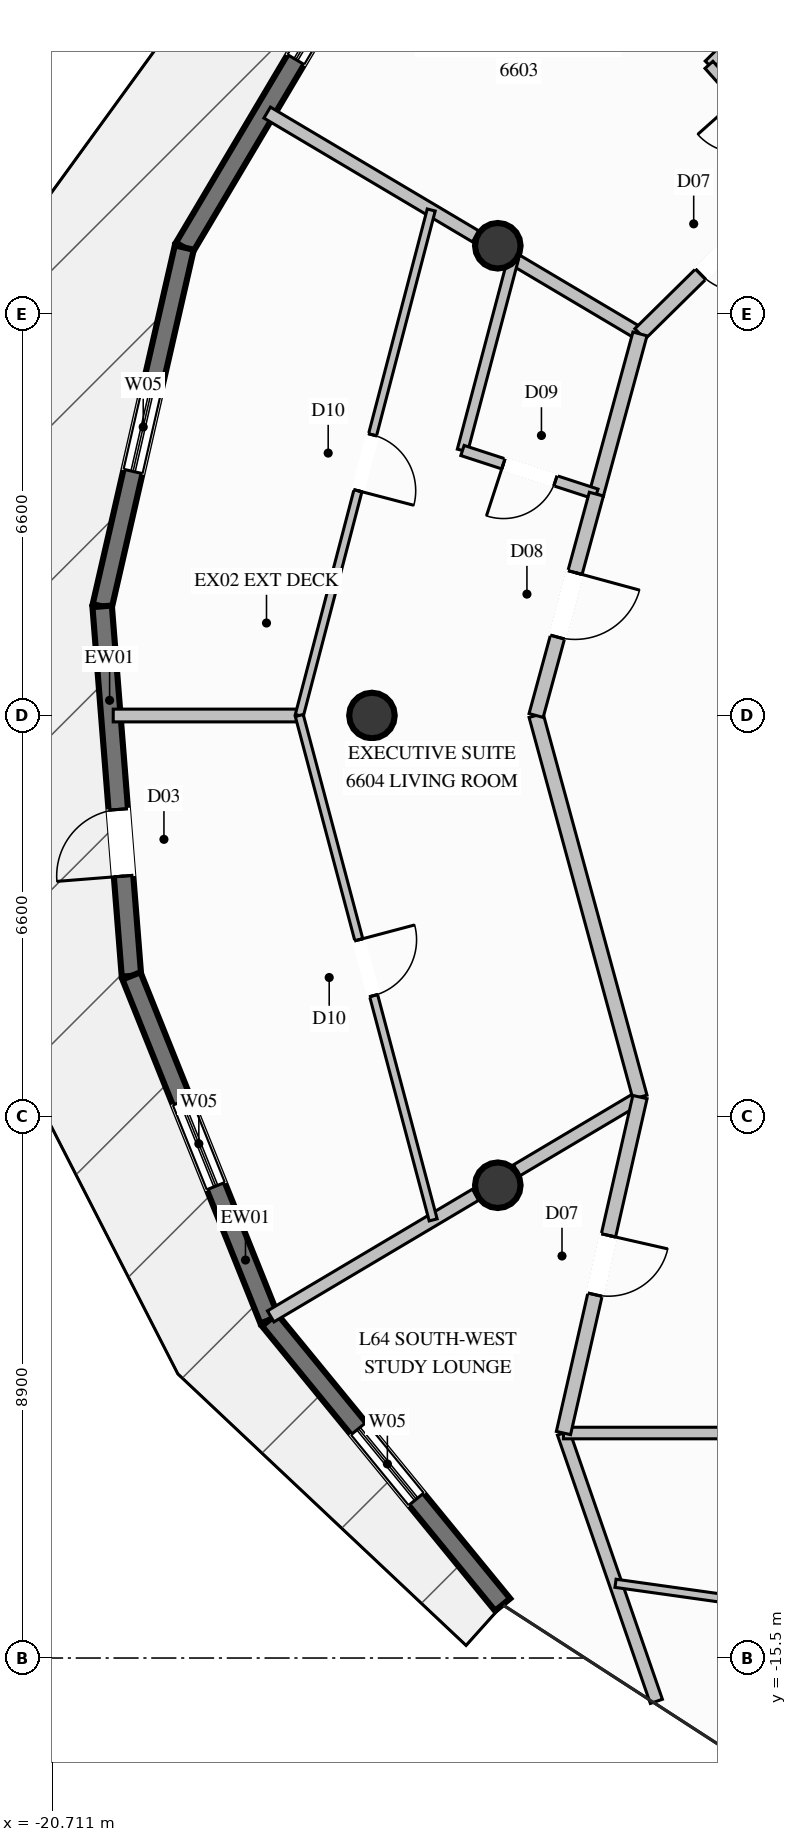
"""IFC4 building model, lengths in metres.
Left out: names, types, materials, properties, quantities, classifications, styles, units other than length and angle.
Written with IfcOpenShell. Run it as: python <this file> out.ifc"""

import sys

from ifc_helpers import new_model, si_unit, direction, frame, frame_2d, origin, origin_2d, place, context, subcontext, project, spatial, rectangle, circle, extrude, element, fill, save


model = new_model("IFC4")
c1 = context("Model", 3, precision=1e-05, world=origin(), true_north=direction((0.0, 1.0)))
c2 = subcontext(c1, "Body", "Model", "MODEL_VIEW")
j1 = project(units=[si_unit("LENGTHUNIT", "METRE"), si_unit("PLANEANGLEUNIT", "RADIAN")], contexts=[c1])
p1 = place(None, origin())
s1 = spatial("IfcSite", under=j1, at=p1, CompositionType="ELEMENT")
p2 = place(p1, origin())
s2 = spatial("IfcBuilding", under=s1, at=p2, CompositionType="ELEMENT")
p3 = place(p2, frame((0.0, 0.0, 246.8)))
s3 = spatial("IfcBuildingStorey", under=s2, at=p3, CompositionType="ELEMENT", Elevation=246.8)
for number, where, z_axis, x_axis in (
    (1, (-13.38, 7.725, 0.0), (0.0, 0.0, 1.0), (1.0, 0.0, 0.0)),
    (2, (-15.45, 0.0, 0.0), (0.0, 0.0, 1.0), (1.0, 0.0, 0.0)),
    (3, (-13.38, -7.725, 0.0), (0.0, 0.0, 1.0), (1.0, 0.0, 0.0)),
):
    element("IfcColumn", number, at=place(p3, frame(where, z_axis=z_axis, x_axis=x_axis)), inside=s3, PredefinedType="COLUMN", context=c2, shape_type="SweptSolid", body=[
        extrude(circle(Radius=0.375, at=origin_2d()), origin(), (0.0, 0.0, 1.0), 3.8),
    ])
p4 = place(p3, frame((-18.536, 7.695, 0.0), z_axis=(0.0, 0.0, 1.0), x_axis=(0.510284251863, 0.860005803644, 0.0)))
e4 = element("IfcWall", 4, at=p4, inside=s3, PredefinedType="SOLIDWALL", context=c2, shape_type="SweptSolid", body=[
    extrude(rectangle(XDim=5.985, YDim=0.32, at=frame_2d((2.992, 0.0))), origin(), (0.0, 0.0, 1.0), 3.57),
])
p5 = place(p4, frame((3.595, 0.0, 0.85)))
e5 = element("IfcOpeningElement", 5, at=p5, cuts=e4, PredefinedType="OPENING", context=c2, shape_type="SweptSolid", body=[
    extrude(rectangle(XDim=1.5, YDim=1.2, at=frame_2d((0.75, 0.6))), frame((0.0, 0.17, 0.0), z_axis=(0.0, -1.0, 0.0), x_axis=(1.0, 0.0, 0.0)), (0.0, 0.0, 1.0), 0.34),
])
p6 = place(p3, frame((-19.887, 1.795, 0.0), z_axis=(0.0, 0.0, 1.0), x_axis=(0.223212485592, 0.974769811943, 0.0)))
e6 = element("IfcWall", 6, at=p6, inside=s3, PredefinedType="SOLIDWALL", context=c2, shape_type="SweptSolid", body=[
    extrude(rectangle(XDim=6.053, YDim=0.32, at=frame_2d((3.026, 0.0))), origin(), (0.0, 0.0, 1.0), 3.57),
])
p7 = place(p6, frame((2.276, 0.0, 0.85)))
e7 = element("IfcOpeningElement", 7, at=p7, cuts=e6, PredefinedType="OPENING", context=c2, shape_type="SweptSolid", body=[
    extrude(rectangle(XDim=1.5, YDim=1.2, at=frame_2d((0.75, 0.6))), frame((0.0, 0.17, 0.0), z_axis=(0.0, -1.0, 0.0), x_axis=(1.0, 0.0, 0.0)), (0.0, 0.0, 1.0), 0.34),
])
p8 = place(p3, frame((-19.405, -4.282, 0.0), z_axis=(0.0, 0.0, 1.0), x_axis=(-0.079057550351, 0.996870053584, 0.0)))
e8 = element("IfcWall", 8, at=p8, inside=s3, PredefinedType="SOLIDWALL", context=c2, shape_type="SweptSolid", body=[
    extrude(rectangle(XDim=6.096, YDim=0.32, at=frame_2d((3.048, 0.0))), origin(), (0.0, 0.0, 1.0), 3.57),
])
p9 = place(p8, frame((1.646, 0.0, 0.0)))
e9 = element("IfcOpeningElement", 9, at=p9, cuts=e8, PredefinedType="OPENING", context=c2, shape_type="SweptSolid", body=[
    extrude(rectangle(XDim=1.1, YDim=2.2, at=frame_2d((0.55, 1.1))), frame((0.0, 0.17, 0.0), z_axis=(0.0, -1.0, 0.0), x_axis=(1.0, 0.0, 0.0)), (0.0, 0.0, 1.0), 0.34),
])
p10 = place(p3, frame((-17.135, -9.939, 0.0), z_axis=(0.0, 0.0, 1.0), x_axis=(-0.372412492589, 0.928067311871, 0.0)))
e10 = element("IfcWall", 10, at=p10, inside=s3, PredefinedType="SOLIDWALL", context=c2, shape_type="SweptSolid", body=[
    extrude(rectangle(XDim=6.095, YDim=0.32, at=frame_2d((3.048, 0.0))), origin(), (0.0, 0.0, 1.0), 3.57),
])
p11 = place(p10, frame((2.37, 0.0, 0.85)))
e11 = element("IfcOpeningElement", 11, at=p11, cuts=e10, PredefinedType="OPENING", context=c2, shape_type="SweptSolid", body=[
    extrude(rectangle(XDim=1.5, YDim=1.2, at=frame_2d((0.75, 0.6))), frame((0.0, 0.17, 0.0), z_axis=(0.0, -1.0, 0.0), x_axis=(1.0, 0.0, 0.0)), (0.0, 0.0, 1.0), 0.34),
])
p12 = place(p3, frame((-13.301, -14.623, 0.0), z_axis=(0.0, 0.0, 1.0), x_axis=(-0.633391522875, 0.773831492478, 0.0)))
e12 = element("IfcWall", 12, at=p12, inside=s3, PredefinedType="SOLIDWALL", context=c2, shape_type="SweptSolid", body=[
    extrude(rectangle(XDim=6.053, YDim=0.32, at=frame_2d((3.027, 0.0))), origin(), (0.0, 0.0, 1.0), 3.57),
])
p13 = place(p12, frame((2.242, 0.0, 0.85)))
e13 = element("IfcOpeningElement", 13, at=p13, cuts=e12, PredefinedType="OPENING", context=c2, shape_type="SweptSolid", body=[
    extrude(rectangle(XDim=1.5, YDim=1.2, at=frame_2d((0.75, 0.6))), frame((0.0, 0.17, 0.0), z_axis=(0.0, -1.0, 0.0), x_axis=(1.0, 0.0, 0.0)), (0.0, 0.0, 1.0), 0.34),
])
p14 = place(p3, frame((-11.042, 6.275, 0.0), z_axis=(0.0, 0.0, 1.0), x_axis=(-0.859975377651, 0.510335526721, 0.0)))
e14 = element("IfcWall", 14, at=p14, inside=s3, PredefinedType="PARTITIONING", context=c2, shape_type="SweptSolid", body=[
    extrude(rectangle(XDim=2.359, YDim=0.21, at=frame_2d((1.18, 0.0))), origin(), (0.0, 0.0, 1.0), 3.011),
])
p15 = place(p3, frame((-13.744, 7.879, 0.0), z_axis=(0.0, 0.0, 1.0), x_axis=(-0.859849705024, 0.510547240488, 0.0)))
e15 = element("IfcWall", 15, at=p15, inside=s3, PredefinedType="PARTITIONING", context=c2, shape_type="SweptSolid", body=[
    extrude(rectangle(XDim=3.988, YDim=0.21, at=frame_2d((1.994, 0.0))), origin(), (0.0, 0.0, 1.0), 3.57),
])
p16 = place(p3, frame((-11.042, -6.275, 0.0), z_axis=(0.0, 0.0, 1.0), x_axis=(-0.859685751386, -0.510823265781, 0.0)))
e16 = element("IfcWall", 16, at=p16, inside=s3, PredefinedType="PARTITIONING", context=c2, shape_type="SweptSolid", body=[
    extrude(rectangle(XDim=2.359, YDim=0.21, at=frame_2d((1.18, 0.0))), origin(), (0.0, 0.0, 1.0), 3.011),
])
p17 = place(p3, frame((-13.744, -7.88, 0.0), z_axis=(0.0, 0.0, 1.0), x_axis=(-0.8597863995, -0.510653842867, 0.0)))
e17 = element("IfcWall", 17, at=p17, inside=s3, PredefinedType="PARTITIONING", context=c2, shape_type="SweptSolid", body=[
    extrude(rectangle(XDim=3.921, YDim=0.21, at=frame_2d((1.96, 0.0))), origin(), (0.0, 0.0, 1.0), 3.57),
])
p18 = place(p3, frame((-7.575, 13.007, 0.0), z_axis=(0.0, 0.0, 1.0), x_axis=(-0.710892186869, -0.703301001456, 0.0)))
e18 = element("IfcWall", 18, at=p18, inside=s3, PredefinedType="PLUMBINGWALL", context=c2, shape_type="SweptSolid", body=[
    extrude(rectangle(XDim=3.281, YDim=0.175, at=frame_2d((1.64, 0.0))), origin(), (0.0, 0.0, 1.0), 3.139),
])
p19 = place(p3, frame((-8.335, 8.94, 0.0), z_axis=(0.0, 0.0, 1.0), x_axis=(-0.666153503552, 0.745814661766, 0.0)))
e19 = element("IfcWall", 19, at=p19, inside=s3, PredefinedType="PLUMBINGWALL", context=c2, shape_type="SweptSolid", body=[
    extrude(rectangle(XDim=2.36, YDim=0.175, at=frame_2d((1.18, 0.0))), origin(), (0.0, 0.0, 1.0), 3.57),
])
p20 = place(p19, frame((0.73, 0.0, 0.0)))
e20 = element("IfcOpeningElement", 20, at=p20, cuts=e19, PredefinedType="OPENING", context=c2, shape_type="SweptSolid", body=[
    extrude(rectangle(XDim=0.9, YDim=2.1, at=frame_2d((0.45, 1.05))), frame((0.0, 0.098, 0.0), z_axis=(0.0, -1.0, 0.0), x_axis=(1.0, 0.0, 0.0)), (0.0, 0.0, 1.0), 0.195),
])
p21 = place(p3, frame((-8.335, 8.94, 0.0), z_axis=(0.0, 0.0, 1.0), x_axis=(-0.712612295011, -0.701558063883, 0.0)))
e21 = element("IfcWall", 21, at=p21, inside=s3, PredefinedType="PARTITIONING", context=c2, shape_type="SweptSolid", body=[
    extrude(rectangle(XDim=3.799, YDim=0.24, at=frame_2d((1.899, 0.0))), origin(), (0.0, 0.0, 1.0), 3.57),
])
p22 = place(p21, frame((1.399, 0.0, 0.0)))
e22 = element("IfcOpeningElement", 22, at=p22, cuts=e21, PredefinedType="OPENING", context=c2, shape_type="SweptSolid", body=[
    extrude(rectangle(XDim=1.0, YDim=2.2, at=frame_2d((0.5, 1.1))), frame((0.0, 0.13, 0.0), z_axis=(0.0, -1.0, 0.0), x_axis=(1.0, 0.0, 0.0)), (0.0, 0.0, 1.0), 0.26),
])
p23 = place(p3, frame((-11.042, 6.275, 0.0), z_axis=(0.0, 0.0, 1.0), x_axis=(-0.262572701387, -0.964912211803, 0.0)))
e23 = element("IfcWall", 23, at=p23, inside=s3, PredefinedType="PARTITIONING", context=c2, shape_type="SweptSolid", body=[
    extrude(rectangle(XDim=2.731, YDim=0.24, at=frame_2d((1.365, 0.0))), origin(), (0.0, 0.0, 1.0), 3.57),
])
p24 = place(p3, frame((-13.127, 7.513, 0.0), z_axis=(0.0, 0.0, 1.0), x_axis=(-0.25555737321, -0.966793891684, 0.0)))
e24 = element("IfcWall", 24, at=p24, inside=s3, PredefinedType="PLUMBINGWALL", context=c2, shape_type="SweptSolid", body=[
    extrude(rectangle(XDim=3.263, YDim=0.175, at=frame_2d((1.632, 0.0))), origin(), (0.0, 0.0, 1.0), 3.006),
])
p25 = place(p3, frame((-11.759, 3.64, 0.0), z_axis=(0.0, 0.0, 1.0), x_axis=(-0.950729164037, 0.310022671187, 0.0)))
e25 = element("IfcWall", 25, at=p25, inside=s3, PredefinedType="PLUMBINGWALL", context=c2, shape_type="SweptSolid", body=[
    extrude(rectangle(XDim=2.316, YDim=0.175, at=frame_2d((1.158, 0.0))), origin(), (0.0, 0.0, 1.0), 3.57),
])
p26 = place(p25, frame((0.708, 0.0, 0.0)))
e26 = element("IfcOpeningElement", 26, at=p26, cuts=e25, PredefinedType="OPENING", context=c2, shape_type="SweptSolid", body=[
    extrude(rectangle(XDim=0.9, YDim=2.1, at=frame_2d((0.45, 1.05))), frame((0.0, 0.098, 0.0), z_axis=(0.0, -1.0, 0.0), x_axis=(1.0, 0.0, 0.0)), (0.0, 0.0, 1.0), 0.195),
])
p27 = place(p3, frame((-16.645, 0.0, 0.0), z_axis=(0.0, 0.0, 1.0), x_axis=(-1.0, 0.0, 0.0)))
e27 = element("IfcWall", 27, at=p27, inside=s3, PredefinedType="PARTITIONING", context=c2, shape_type="SweptSolid", body=[
    extrude(rectangle(XDim=3.06, YDim=0.21, at=frame_2d((1.53, 0.0))), origin(), (0.0, 0.0, 1.0), 2.619),
])
p28 = place(p3, frame((-12.75, 0.0, 0.0), z_axis=(0.0, 0.0, 1.0), x_axis=(0.262640884433, -0.964893655189, 0.0)))
e28 = element("IfcWall", 28, at=p28, inside=s3, PredefinedType="PARTITIONING", context=c2, shape_type="SweptSolid", body=[
    extrude(rectangle(XDim=6.503, YDim=0.24, at=frame_2d((3.251, 0.0))), origin(), (0.0, 0.0, 1.0), 3.57),
])
p29 = place(p3, frame((-11.759, 3.64, 0.0), z_axis=(0.0, 0.0, 1.0), x_axis=(-0.2626902414, -0.964880219029, 0.0)))
e29 = element("IfcWall", 29, at=p29, inside=s3, PredefinedType="PARTITIONING", context=c2, shape_type="SweptSolid", body=[
    extrude(rectangle(XDim=3.772, YDim=0.24, at=frame_2d((1.886, 0.0))), origin(), (0.0, 0.0, 1.0), 3.57),
])
p30 = place(p29, frame((1.336, 0.0, 0.0)))
e30 = element("IfcOpeningElement", 30, at=p30, cuts=e29, PredefinedType="OPENING", context=c2, shape_type="SweptSolid", body=[
    extrude(rectangle(XDim=1.1, YDim=2.3, at=frame_2d((0.55, 1.15))), frame((0.0, 0.13, 0.0), z_axis=(0.0, -1.0, 0.0), x_axis=(1.0, 0.0, 0.0)), (0.0, 0.0, 1.0), 0.26),
])
p31 = place(p3, frame((-14.475, 8.313, 0.0), z_axis=(0.0, 0.0, 1.0), x_axis=(-0.252565334536, -0.967579842592, 0.0)))
e31 = element("IfcWall", 31, at=p31, inside=s3, PredefinedType="PARTITIONING", context=c2, shape_type="SweptSolid", body=[
    extrude(rectangle(XDim=8.592, YDim=0.135, at=frame_2d((4.296, 0.0))), origin(), (0.0, 0.0, 1.0), 3.57),
])
p32 = place(p31, frame((3.821, 0.0, 0.0)))
e32 = element("IfcOpeningElement", 32, at=p32, cuts=e31, PredefinedType="OPENING", context=c2, shape_type="SweptSolid", body=[
    extrude(rectangle(XDim=0.95, YDim=2.1, at=frame_2d((0.475, 1.05))), frame((0.0, 0.078, 0.0), z_axis=(0.0, -1.0, 0.0), x_axis=(1.0, 0.0, 0.0)), (0.0, 0.0, 1.0), 0.155),
])
p33 = place(p3, frame((-16.645, 0.0, 0.0), z_axis=(0.0, 0.0, 1.0), x_axis=(0.256566495237, -0.966526581901, 0.0)))
e33 = element("IfcWall", 33, at=p33, inside=s3, PredefinedType="PARTITIONING", context=c2, shape_type="SweptSolid", body=[
    extrude(rectangle(XDim=8.582, YDim=0.135, at=frame_2d((4.291, 0.0))), origin(), (0.0, 0.0, 1.0), 3.57),
])
p34 = place(p33, frame((3.816, 0.0, 0.0)))
e34 = element("IfcOpeningElement", 34, at=p34, cuts=e33, PredefinedType="OPENING", context=c2, shape_type="SweptSolid", body=[
    extrude(rectangle(XDim=0.95, YDim=2.1, at=frame_2d((0.475, 1.05))), frame((0.0, 0.078, 0.0), z_axis=(0.0, -1.0, 0.0), x_axis=(1.0, 0.0, 0.0)), (0.0, 0.0, 1.0), 0.155),
])
p35 = place(p3, frame((-12.3, -11.8, 0.0), z_axis=(0.0, 0.0, 1.0), x_axis=(0.327216501768, -0.944949395984, 0.0)))
e35 = element("IfcWall", 35, at=p35, inside=s3, PredefinedType="PARTITIONING", context=c2, shape_type="SweptSolid", body=[
    extrude(rectangle(XDim=4.67, YDim=0.21, at=frame_2d((2.335, 0.0))), origin(), (0.0, 0.0, 1.0), 3.57),
])
p36 = place(p3, frame((-12.3, -11.8, 0.0), z_axis=(0.0, 0.0, 1.0), x_axis=(1.0, 0.0, 0.0)))
e36 = element("IfcWall", 36, at=p36, inside=s3, PredefinedType="PARTITIONING", context=c2, shape_type="SweptSolid", body=[
    extrude(rectangle(XDim=12.3, YDim=0.19, at=frame_2d((6.15, 0.0))), origin(), (0.0, 0.0, 1.0), 3.57),
])
p37 = place(p36, frame((5.675, 0.0, 0.0)))
e37 = element("IfcOpeningElement", 37, at=p37, cuts=e36, PredefinedType="OPENING", context=c2, shape_type="SweptSolid", body=[
    extrude(rectangle(XDim=0.95, YDim=2.1, at=frame_2d((0.475, 1.05))), frame((0.0, 0.105, 0.0), z_axis=(0.0, -1.0, 0.0), x_axis=(1.0, 0.0, 0.0)), (0.0, 0.0, 1.0), 0.21),
])
p38 = place(p3, frame((-11.042, -6.275, 0.0), z_axis=(0.0, 0.0, 1.0), x_axis=(-0.222014008723, -0.975043475918, 0.0)))
e38 = element("IfcWall", 38, at=p38, inside=s3, PredefinedType="PARTITIONING", context=c2, shape_type="SweptSolid", body=[
    extrude(rectangle(XDim=5.667, YDim=0.24, at=frame_2d((2.833, 0.0))), origin(), (0.0, 0.0, 1.0), 3.57),
])
p39 = place(p38, frame((2.333, 0.0, 0.0)))
e39 = element("IfcOpeningElement", 39, at=p39, cuts=e38, PredefinedType="OPENING", context=c2, shape_type="SweptSolid", body=[
    extrude(rectangle(XDim=1.0, YDim=2.2, at=frame_2d((0.5, 1.1))), frame((0.0, 0.13, 0.0), z_axis=(0.0, -1.0, 0.0), x_axis=(1.0, 0.0, 0.0)), (0.0, 0.0, 1.0), 0.26),
])
p40 = place(p3, frame((-11.444, -14.271, 0.0), z_axis=(0.0, 0.0, 1.0), x_axis=(0.990280714827, -0.139083089705, 0.0)))
e40 = element("IfcWall", 40, at=p40, inside=s3, PredefinedType="PARTITIONING", context=c2, shape_type="SweptSolid", body=[
    extrude(rectangle(XDim=11.784, YDim=0.135, at=frame_2d((5.892, 0.0))), origin(), (0.0, 0.0, 1.0), 3.139),
])
p41 = place(p40, frame((5.417, 0.0, 0.0)))
e41 = element("IfcOpeningElement", 41, at=p41, cuts=e40, PredefinedType="OPENING", context=c2, shape_type="SweptSolid", body=[
    extrude(rectangle(XDim=0.95, YDim=2.1, at=frame_2d((0.475, 1.05))), frame((0.0, 0.078, 0.0), z_axis=(0.0, -1.0, 0.0), x_axis=(1.0, 0.0, 0.0)), (0.0, 0.0, 1.0), 0.155),
])
p42 = place(p5, origin())
e42 = element("IfcWindow", 42, at=p42, inside=s3, PartitioningType="SINGLE_PANEL", PredefinedType="WINDOW", context=c2, shape_type="SweptSolid", body=[
    extrude(rectangle(XDim=1.5, YDim=1.2, at=frame_2d((0.75, 0.6))), frame((0.0, 0.03, 0.0), z_axis=(0.0, -1.0, 0.0), x_axis=(1.0, 0.0, 0.0)), (0.0, 0.0, 1.0), 0.06),
])
fill(e5, e42)
p43 = place(p7, origin())
e43 = element("IfcWindow", 43, at=p43, inside=s3, PartitioningType="SINGLE_PANEL", PredefinedType="WINDOW", context=c2, shape_type="SweptSolid", body=[
    extrude(rectangle(XDim=1.5, YDim=1.2, at=frame_2d((0.75, 0.6))), frame((0.0, 0.03, 0.0), z_axis=(0.0, -1.0, 0.0), x_axis=(1.0, 0.0, 0.0)), (0.0, 0.0, 1.0), 0.06),
])
fill(e7, e43)
p44 = place(p9, origin())
e44 = element("IfcDoor", 44, at=p44, inside=s3, OperationType="SINGLE_SWING_LEFT", PredefinedType="DOOR", context=c2, shape_type="SweptSolid", body=[
    extrude(rectangle(XDim=1.1, YDim=2.2, at=frame_2d((0.55, 1.1))), frame((0.0, 0.025, 0.0), z_axis=(0.0, -1.0, 0.0), x_axis=(1.0, 0.0, 0.0)), (0.0, 0.0, 1.0), 0.05),
])
fill(e9, e44)
p45 = place(p11, origin())
e45 = element("IfcWindow", 45, at=p45, inside=s3, PartitioningType="SINGLE_PANEL", PredefinedType="WINDOW", context=c2, shape_type="SweptSolid", body=[
    extrude(rectangle(XDim=1.5, YDim=1.2, at=frame_2d((0.75, 0.6))), frame((0.0, 0.03, 0.0), z_axis=(0.0, -1.0, 0.0), x_axis=(1.0, 0.0, 0.0)), (0.0, 0.0, 1.0), 0.06),
])
fill(e11, e45)
p46 = place(p13, origin())
e46 = element("IfcWindow", 46, at=p46, inside=s3, PartitioningType="SINGLE_PANEL", PredefinedType="WINDOW", context=c2, shape_type="SweptSolid", body=[
    extrude(rectangle(XDim=1.5, YDim=1.2, at=frame_2d((0.75, 0.6))), frame((0.0, 0.03, 0.0), z_axis=(0.0, -1.0, 0.0), x_axis=(1.0, 0.0, 0.0)), (0.0, 0.0, 1.0), 0.06),
])
fill(e13, e46)
p47 = place(p22, origin())
e47 = element("IfcDoor", 47, at=p47, inside=s3, OperationType="SINGLE_SWING_LEFT", PredefinedType="DOOR", context=c2, shape_type="SweptSolid", body=[
    extrude(rectangle(XDim=1.0, YDim=2.2, at=frame_2d((0.5, 1.1))), frame((0.0, 0.025, 0.0), z_axis=(0.0, -1.0, 0.0), x_axis=(1.0, 0.0, 0.0)), (0.0, 0.0, 1.0), 0.05),
])
fill(e22, e47)
p48 = place(p26, origin())
e48 = element("IfcDoor", 48, at=p48, inside=s3, OperationType="SINGLE_SWING_RIGHT", PredefinedType="DOOR", context=c2, shape_type="SweptSolid", body=[
    extrude(rectangle(XDim=0.9, YDim=2.1, at=frame_2d((0.45, 1.05))), frame((0.0, 0.025, 0.0), z_axis=(0.0, -1.0, 0.0), x_axis=(1.0, 0.0, 0.0)), (0.0, 0.0, 1.0), 0.05),
])
fill(e26, e48)
p49 = place(p30, origin())
e49 = element("IfcDoor", 49, at=p49, inside=s3, OperationType="SINGLE_SWING_LEFT", PredefinedType="DOOR", context=c2, shape_type="SweptSolid", body=[
    extrude(rectangle(XDim=1.1, YDim=2.3, at=frame_2d((0.55, 1.15))), frame((0.0, 0.025, 0.0), z_axis=(0.0, -1.0, 0.0), x_axis=(1.0, 0.0, 0.0)), (0.0, 0.0, 1.0), 0.05),
])
fill(e30, e49)
p50 = place(p32, origin())
e50 = element("IfcDoor", 50, at=p50, inside=s3, OperationType="SINGLE_SWING_RIGHT", PredefinedType="DOOR", context=c2, shape_type="SweptSolid", body=[
    extrude(rectangle(XDim=0.95, YDim=2.1, at=frame_2d((0.475, 1.05))), frame((0.0, 0.025, 0.0), z_axis=(0.0, -1.0, 0.0), x_axis=(1.0, 0.0, 0.0)), (0.0, 0.0, 1.0), 0.05),
])
fill(e32, e50)
p51 = place(p34, origin())
e51 = element("IfcDoor", 51, at=p51, inside=s3, OperationType="SINGLE_SWING_LEFT", PredefinedType="DOOR", context=c2, shape_type="SweptSolid", body=[
    extrude(rectangle(XDim=0.95, YDim=2.1, at=frame_2d((0.475, 1.05))), frame((0.0, 0.025, 0.0), z_axis=(0.0, -1.0, 0.0), x_axis=(1.0, 0.0, 0.0)), (0.0, 0.0, 1.0), 0.05),
])
fill(e34, e51)
p52 = place(p39, origin())
e52 = element("IfcDoor", 52, at=p52, inside=s3, OperationType="SINGLE_SWING_LEFT", PredefinedType="DOOR", context=c2, shape_type="SweptSolid", body=[
    extrude(rectangle(XDim=1.0, YDim=2.2, at=frame_2d((0.5, 1.1))), frame((0.0, 0.025, 0.0), z_axis=(0.0, -1.0, 0.0), x_axis=(1.0, 0.0, 0.0)), (0.0, 0.0, 1.0), 0.05),
])
fill(e39, e52)
save(model, sys.argv[1])
